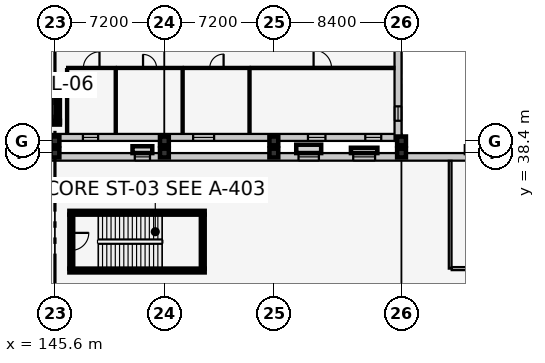
"""IFC4 building model, lengths in metres.
Left out: names, types, materials, properties, quantities, classifications, styles, units other than length and angle.
Written with IfcOpenShell. Run it as: python <this file> out.ifc"""

import sys

from ifc_helpers import new_model, si_unit, direction, frame, frame_2d, origin, origin_2d, place, context, subcontext, project, spatial, rectangle, extrude, element, fill, save


model = new_model("IFC4")
c1 = context("Model", 3, precision=1e-05, world=origin(), true_north=direction((0.0, 1.0)))
c2 = subcontext(c1, "Body", "Model", "MODEL_VIEW")
j1 = project(units=[si_unit("LENGTHUNIT", "METRE"), si_unit("PLANEANGLEUNIT", "RADIAN")], contexts=[c1])
p1 = place(None, origin())
s1 = spatial("IfcSite", under=j1, at=p1, CompositionType="ELEMENT")
p2 = place(p1, origin())
s2 = spatial("IfcBuilding", under=s1, at=p2, CompositionType="ELEMENT")
p3 = place(p2, origin())
s3 = spatial("IfcBuildingStorey", under=s2, at=p3, CompositionType="ELEMENT", Elevation=0.0)
for number, where, z_axis, x_axis in (
    (1, (145.6, 38.4, 0.0), (0.0, 0.0, 1.0), (1.0, 0.0, 0.0)),
    (2, (152.8, 38.4, 0.0), (0.0, 0.0, 1.0), (1.0, 0.0, 0.0)),
    (3, (160.0, 38.4, 0.0), (0.0, 0.0, 1.0), (1.0, 0.0, 0.0)),
    (4, (168.4, 38.4, 0.0), (0.0, 0.0, 1.0), (1.0, 0.0, 0.0)),
    (5, (145.6, 39.2, 0.0), (0.0, 0.0, 1.0), (1.0, 0.0, 0.0)),
    (6, (152.8, 39.2, 0.0), (0.0, 0.0, 1.0), (1.0, 0.0, 0.0)),
    (7, (160.0, 39.2, 0.0), (0.0, 0.0, 1.0), (1.0, 0.0, 0.0)),
    (8, (168.4, 39.2, 0.0), (0.0, 0.0, 1.0), (1.0, 0.0, 0.0)),
):
    element("IfcColumn", number, at=place(p3, frame(where, z_axis=z_axis, x_axis=x_axis)), inside=s3, PredefinedType="COLUMN", context=c2, shape_type="SweptSolid", body=[
        extrude(rectangle(XDim=0.58, YDim=0.58, at=origin_2d()), origin(), (0.0, 0.0, 1.0), 5.4),
    ])
p4 = place(p3, frame((124.0, 38.15, 0.0), z_axis=(0.0, 0.0, 1.0), x_axis=(1.0, 0.0, 0.0)))
e9 = element("IfcWall", 9, at=p4, inside=s3, PredefinedType="SOLIDWALL", context=c2, shape_type="SweptSolid", body=[
    extrude(rectangle(XDim=62.0, YDim=0.5, at=frame_2d((31.0, 0.0))), origin(), (0.0, 0.0, 1.0), 4.275),
])
p5 = place(p4, frame((17.1, 0.0, 0.0)))
e10 = element("IfcOpeningElement", 10, at=p5, cuts=e9, PredefinedType="OPENING", context=c2, shape_type="SweptSolid", body=[
    extrude(rectangle(XDim=1.8, YDim=2.3, at=frame_2d((0.9, 1.15))), frame((0.0, 0.262, 0.0), z_axis=(0.0, -1.0, 0.0), x_axis=(1.0, 0.0, 0.0)), (0.0, 0.0, 1.0), 0.524),
])
p6 = place(p4, frame((1.098, 0.0, 0.9)))
e11 = element("IfcOpeningElement", 11, at=p6, cuts=e9, PredefinedType="OPENING", context=c2, shape_type="SweptSolid", body=[
    extrude(rectangle(XDim=1.45, YDim=1.45, at=frame_2d((0.725, 0.725))), frame((0.0, 0.262, 0.0), z_axis=(0.0, -1.0, 0.0), x_axis=(1.0, 0.0, 0.0)), (0.0, 0.0, 1.0), 0.524),
])
p7 = place(p4, frame((26.853, 0.0, 0.9)))
e12 = element("IfcOpeningElement", 12, at=p7, cuts=e9, PredefinedType="OPENING", context=c2, shape_type="SweptSolid", body=[
    extrude(rectangle(XDim=1.0, YDim=1.75, at=frame_2d((0.5, 0.875))), frame((0.0, 0.262, 0.0), z_axis=(0.0, -1.0, 0.0), x_axis=(1.0, 0.0, 0.0)), (0.0, 0.0, 1.0), 0.524),
])
p8 = place(p4, frame((37.624, 0.0, 0.9)))
e13 = element("IfcOpeningElement", 13, at=p8, cuts=e9, PredefinedType="OPENING", context=c2, shape_type="SweptSolid", body=[
    extrude(rectangle(XDim=1.34, YDim=1.75, at=frame_2d((0.67, 0.875))), frame((0.0, 0.262, 0.0), z_axis=(0.0, -1.0, 0.0), x_axis=(1.0, 0.0, 0.0)), (0.0, 0.0, 1.0), 0.524),
])
p9 = place(p4, frame((41.221, 0.0, 0.9)))
e14 = element("IfcOpeningElement", 14, at=p9, cuts=e9, PredefinedType="OPENING", context=c2, shape_type="SweptSolid", body=[
    extrude(rectangle(XDim=1.44, YDim=1.75, at=frame_2d((0.72, 0.875))), frame((0.0, 0.262, 0.0), z_axis=(0.0, -1.0, 0.0), x_axis=(1.0, 0.0, 0.0)), (0.0, 0.0, 1.0), 0.524),
])
p10 = place(p4, frame((48.785, 0.0, 0.9)))
e15 = element("IfcOpeningElement", 15, at=p10, cuts=e9, PredefinedType="OPENING", context=c2, shape_type="SweptSolid", body=[
    extrude(rectangle(XDim=0.9, YDim=1.35, at=frame_2d((0.45, 0.675))), frame((0.0, 0.262, 0.0), z_axis=(0.0, -1.0, 0.0), x_axis=(1.0, 0.0, 0.0)), (0.0, 0.0, 1.0), 0.524),
])
p11 = place(p4, frame((55.979, 0.0, 0.9)))
e16 = element("IfcOpeningElement", 16, at=p11, cuts=e9, PredefinedType="OPENING", context=c2, shape_type="SweptSolid", body=[
    extrude(rectangle(XDim=1.1, YDim=1.35, at=frame_2d((0.55, 0.675))), frame((0.0, 0.262, 0.0), z_axis=(0.0, -1.0, 0.0), x_axis=(1.0, 0.0, 0.0)), (0.0, 0.0, 1.0), 0.524),
])
p12 = place(p4, frame((59.576, 0.0, 0.9)))
e17 = element("IfcOpeningElement", 17, at=p12, cuts=e9, PredefinedType="OPENING", context=c2, shape_type="SweptSolid", body=[
    extrude(rectangle(XDim=1.2, YDim=1.35, at=frame_2d((0.6, 0.675))), frame((0.0, 0.262, 0.0), z_axis=(0.0, -1.0, 0.0), x_axis=(1.0, 0.0, 0.0)), (0.0, 0.0, 1.0), 0.524),
])
p13 = place(p3, frame((168.4, 39.43, 0.0), z_axis=(0.0, 0.0, 1.0), x_axis=(-1.0, 0.0, 0.0)))
e18 = element("IfcWall", 18, at=p13, inside=s3, PredefinedType="SOLIDWALL", context=c2, shape_type="SweptSolid", body=[
    extrude(rectangle(XDim=37.2, YDim=0.46, at=frame_2d((18.6, 0.0))), origin(), (0.0, 0.0, 1.0), 4.315),
])
p14 = place(p13, frame((1.335, 0.0, 0.9)))
e19 = element("IfcOpeningElement", 19, at=p14, cuts=e18, PredefinedType="OPENING", context=c2, shape_type="SweptSolid", body=[
    extrude(rectangle(XDim=1.05, YDim=1.6, at=frame_2d((0.525, 0.8))), frame((0.0, 0.242, 0.0), z_axis=(0.0, -1.0, 0.0), x_axis=(1.0, 0.0, 0.0)), (0.0, 0.0, 1.0), 0.484),
])
p15 = place(p13, frame((5.005, 0.0, 0.9)))
e20 = element("IfcOpeningElement", 20, at=p15, cuts=e18, PredefinedType="OPENING", context=c2, shape_type="SweptSolid", body=[
    extrude(rectangle(XDim=1.15, YDim=1.6, at=frame_2d((0.575, 0.8))), frame((0.0, 0.242, 0.0), z_axis=(0.0, -1.0, 0.0), x_axis=(1.0, 0.0, 0.0)), (0.0, 0.0, 1.0), 0.484),
])
p16 = place(p13, frame((12.33, 0.0, 0.9)))
e21 = element("IfcOpeningElement", 21, at=p16, cuts=e18, PredefinedType="OPENING", context=c2, shape_type="SweptSolid", body=[
    extrude(rectangle(XDim=1.38, YDim=1.6, at=frame_2d((0.69, 0.8))), frame((0.0, 0.242, 0.0), z_axis=(0.0, -1.0, 0.0), x_axis=(1.0, 0.0, 0.0)), (0.0, 0.0, 1.0), 0.484),
])
p17 = place(p13, frame((19.96, 0.0, 0.9)))
e22 = element("IfcOpeningElement", 22, at=p17, cuts=e18, PredefinedType="OPENING", context=c2, shape_type="SweptSolid", body=[
    extrude(rectangle(XDim=1.0, YDim=1.75, at=frame_2d((0.5, 0.875))), frame((0.0, 0.242, 0.0), z_axis=(0.0, -1.0, 0.0), x_axis=(1.0, 0.0, 0.0)), (0.0, 0.0, 1.0), 0.484),
])
p18 = place(p13, frame((27.28, 0.0, 0.9)))
e23 = element("IfcOpeningElement", 23, at=p18, cuts=e18, PredefinedType="OPENING", context=c2, shape_type="SweptSolid", body=[
    extrude(rectangle(XDim=1.24, YDim=1.75, at=frame_2d((0.62, 0.875))), frame((0.0, 0.242, 0.0), z_axis=(0.0, -1.0, 0.0), x_axis=(1.0, 0.0, 0.0)), (0.0, 0.0, 1.0), 0.484),
])
p19 = place(p13, frame((30.95, 0.0, 0.9)))
e24 = element("IfcOpeningElement", 24, at=p19, cuts=e18, PredefinedType="OPENING", context=c2, shape_type="SweptSolid", body=[
    extrude(rectangle(XDim=1.34, YDim=1.75, at=frame_2d((0.67, 0.875))), frame((0.0, 0.242, 0.0), z_axis=(0.0, -1.0, 0.0), x_axis=(1.0, 0.0, 0.0)), (0.0, 0.0, 1.0), 0.484),
])
p20 = place(p13, frame((34.62, 0.0, 0.9)))
e25 = element("IfcOpeningElement", 25, at=p20, cuts=e18, PredefinedType="OPENING", context=c2, shape_type="SweptSolid", body=[
    extrude(rectangle(XDim=1.44, YDim=1.75, at=frame_2d((0.72, 0.875))), frame((0.0, 0.242, 0.0), z_axis=(0.0, -1.0, 0.0), x_axis=(1.0, 0.0, 0.0)), (0.0, 0.0, 1.0), 0.484),
])
p21 = place(p3, frame((168.17, 68.0, 0.0), z_axis=(0.0, 0.0, 1.0), x_axis=(0.0, -1.0, 0.0)))
e26 = element("IfcWall", 26, at=p21, inside=s3, PredefinedType="SOLIDWALL", context=c2, shape_type="SweptSolid", body=[
    extrude(rectangle(XDim=28.8, YDim=0.46, at=frame_2d((14.4, 0.0))), origin(), (0.0, 0.0, 1.0), 4.555),
])
p22 = place(p21, frame((1.05, 0.0, 0.9)))
e27 = element("IfcOpeningElement", 27, at=p22, cuts=e26, PredefinedType="OPENING", context=c2, shape_type="SweptSolid", body=[
    extrude(rectangle(XDim=1.5, YDim=1.75, at=frame_2d((0.75, 0.875))), frame((0.0, 0.242, 0.0), z_axis=(0.0, -1.0, 0.0), x_axis=(1.0, 0.0, 0.0)), (0.0, 0.0, 1.0), 0.484),
])
p23 = place(p21, frame((4.95, 0.0, 0.9)))
e28 = element("IfcOpeningElement", 28, at=p23, cuts=e26, PredefinedType="OPENING", context=c2, shape_type="SweptSolid", body=[
    extrude(rectangle(XDim=0.9, YDim=1.35, at=frame_2d((0.45, 0.675))), frame((0.0, 0.242, 0.0), z_axis=(0.0, -1.0, 0.0), x_axis=(1.0, 0.0, 0.0)), (0.0, 0.0, 1.0), 0.484),
])
p24 = place(p21, frame((8.5, 0.0, 0.9)))
e29 = element("IfcOpeningElement", 29, at=p24, cuts=e26, PredefinedType="OPENING", context=c2, shape_type="SweptSolid", body=[
    extrude(rectangle(XDim=1.0, YDim=1.35, at=frame_2d((0.5, 0.675))), frame((0.0, 0.242, 0.0), z_axis=(0.0, -1.0, 0.0), x_axis=(1.0, 0.0, 0.0)), (0.0, 0.0, 1.0), 0.484),
])
p25 = place(p21, frame((12.05, 0.0, 0.9)))
e30 = element("IfcOpeningElement", 30, at=p25, cuts=e26, PredefinedType="OPENING", context=c2, shape_type="SweptSolid", body=[
    extrude(rectangle(XDim=1.1, YDim=1.35, at=frame_2d((0.55, 0.675))), frame((0.0, 0.242, 0.0), z_axis=(0.0, -1.0, 0.0), x_axis=(1.0, 0.0, 0.0)), (0.0, 0.0, 1.0), 0.484),
])
p26 = place(p21, frame((15.6, 0.0, 0.9)))
e31 = element("IfcOpeningElement", 31, at=p26, cuts=e26, PredefinedType="OPENING", context=c2, shape_type="SweptSolid", body=[
    extrude(rectangle(XDim=1.2, YDim=1.35, at=frame_2d((0.6, 0.675))), frame((0.0, 0.242, 0.0), z_axis=(0.0, -1.0, 0.0), x_axis=(1.0, 0.0, 0.0)), (0.0, 0.0, 1.0), 0.484),
])
p27 = place(p21, frame((19.15, 0.0, 0.9)))
e32 = element("IfcOpeningElement", 32, at=p27, cuts=e26, PredefinedType="OPENING", context=c2, shape_type="SweptSolid", body=[
    extrude(rectangle(XDim=1.3, YDim=1.35, at=frame_2d((0.65, 0.675))), frame((0.0, 0.242, 0.0), z_axis=(0.0, -1.0, 0.0), x_axis=(1.0, 0.0, 0.0)), (0.0, 0.0, 1.0), 0.484),
])
p28 = place(p21, frame((26.525, 0.0, 0.9)))
e33 = element("IfcOpeningElement", 33, at=p28, cuts=e26, PredefinedType="OPENING", context=c2, shape_type="SweptSolid", body=[
    extrude(rectangle(XDim=0.95, YDim=1.45, at=frame_2d((0.475, 0.725))), frame((0.0, 0.242, 0.0), z_axis=(0.0, -1.0, 0.0), x_axis=(1.0, 0.0, 0.0)), (0.0, 0.0, 1.0), 0.484),
])
for number, where, z_axis, x_axis in (
    (34, (146.55, 30.675, 0.0), (0.0, 0.0, 1.0), (1.0, 0.0, 0.0)),
    (35, (155.45, 34.475, 0.0), (0.0, 0.0, 1.0), (-1.0, 0.0, 0.0)),
):
    element("IfcWall", number, at=place(p3, frame(where, z_axis=z_axis, x_axis=x_axis)), inside=s3, PredefinedType="SHEAR", context=c2, shape_type="SweptSolid", body=[
        extrude(rectangle(XDim=8.9, YDim=0.25, at=frame_2d((4.45, 0.0))), origin(), (0.0, 0.0, 1.0), 5.12),
    ])
p29 = place(p3, frame((146.675, 34.35, 0.0), z_axis=(0.0, 0.0, 1.0), x_axis=(0.0, -1.0, 0.0)))
e36 = element("IfcWall", 36, at=p29, inside=s3, PredefinedType="SHEAR", context=c2, shape_type="SweptSolid", body=[
    extrude(rectangle(XDim=3.55, YDim=0.25, at=frame_2d((1.775, 0.0))), origin(), (0.0, 0.0, 1.0), 5.12),
])
p30 = place(p29, frame((1.2, 0.0, 0.0)))
e37 = element("IfcOpeningElement", 37, at=p30, cuts=e36, PredefinedType="OPENING", context=c2, shape_type="SweptSolid", body=[
    extrude(rectangle(XDim=1.15, YDim=2.15, at=frame_2d((0.575, 1.075))), frame((0.0, 0.137, 0.0), z_axis=(0.0, -1.0, 0.0), x_axis=(1.0, 0.0, 0.0)), (0.0, 0.0, 1.0), 0.274),
])
p31 = place(p3, frame((155.325, 30.8, 0.0), z_axis=(0.0, 0.0, 1.0), x_axis=(0.0, 1.0, 0.0)))
e38 = element("IfcWall", 38, at=p31, inside=s3, PredefinedType="SHEAR", context=c2, shape_type="SweptSolid", body=[
    extrude(rectangle(XDim=3.55, YDim=0.25, at=frame_2d((1.775, 0.0))), origin(), (0.0, 0.0, 1.0), 5.12),
])
p32 = place(p3, frame((143.875, 40.4, 0.0), z_axis=(0.0, 0.0, 1.0), x_axis=(1.0, 0.0, 0.0)))
e39 = element("IfcWall", 39, at=p32, inside=s3, PredefinedType="SHEAR", context=c2, shape_type="SweptSolid", body=[
    extrude(rectangle(XDim=2.05, YDim=0.25, at=frame_2d((1.025, 0.0))), origin(), (0.0, 0.0, 1.0), 5.16),
])
p33 = place(p3, frame((145.925, 42.4, 0.0), z_axis=(0.0, 0.0, 1.0), x_axis=(-1.0, 0.0, 0.0)))
e40 = element("IfcWall", 40, at=p33, inside=s3, PredefinedType="SHEAR", context=c2, shape_type="SweptSolid", body=[
    extrude(rectangle(XDim=2.05, YDim=0.25, at=frame_2d((1.025, 0.0))), origin(), (0.0, 0.0, 1.0), 5.16),
])
p34 = place(p33, frame((0.55, 0.0, 0.0)))
e41 = element("IfcOpeningElement", 41, at=p34, cuts=e40, PredefinedType="OPENING", context=c2, shape_type="SweptSolid", body=[
    extrude(rectangle(XDim=0.95, YDim=2.1, at=frame_2d((0.475, 1.05))), frame((0.0, 0.137, 0.0), z_axis=(0.0, -1.0, 0.0), x_axis=(1.0, 0.0, 0.0)), (0.0, 0.0, 1.0), 0.274),
])
p35 = place(p3, frame((145.8, 40.4, 0.0), z_axis=(0.0, 0.0, 1.0), x_axis=(0.0, 1.0, 0.0)))
e42 = element("IfcWall", 42, at=p35, inside=s3, PredefinedType="SHEAR", context=c2, shape_type="SweptSolid", body=[
    extrude(rectangle(XDim=2.0, YDim=0.25, at=frame_2d((1.0, 0.0))), origin(), (0.0, 0.0, 1.0), 5.16),
])
p36 = place(p3, frame((171.6, 30.8, 0.0), z_axis=(0.0, 0.0, 1.0), x_axis=(0.0, 1.0, 0.0)))
e43 = element("IfcWall", 43, at=p36, inside=s3, PredefinedType="PARTITIONING", context=c2, shape_type="SweptSolid", body=[
    extrude(rectangle(XDim=7.09, YDim=0.18, at=frame_2d((3.545, 0.0))), origin(), (0.0, 0.0, 1.0), 5.12),
])
p37 = place(p3, frame((171.7, 30.8, 0.0), z_axis=(0.0, 0.0, 1.0), x_axis=(1.0, 0.0, 0.0)))
e44 = element("IfcWall", 44, at=p37, inside=s3, PredefinedType="PARTITIONING", context=c2, shape_type="SweptSolid", body=[
    extrude(rectangle(XDim=13.79, YDim=0.2, at=frame_2d((6.895, 0.0))), origin(), (0.0, 0.0, 1.0), 5.12),
])
p38 = place(p37, frame((6.235, 0.0, 0.0)))
e45 = element("IfcOpeningElement", 45, at=p38, cuts=e44, PredefinedType="OPENING", context=c2, shape_type="SweptSolid", body=[
    extrude(rectangle(XDim=1.32, YDim=2.15, at=frame_2d((0.66, 1.075))), frame((0.0, 0.112, 0.0), z_axis=(0.0, -1.0, 0.0), x_axis=(1.0, 0.0, 0.0)), (0.0, 0.0, 1.0), 0.224),
])
p39 = place(p3, frame((146.4, 44.0, 0.0), z_axis=(0.0, 0.0, 1.0), x_axis=(1.0, 0.0, 0.0)))
e46 = element("IfcWall", 46, at=p39, inside=s3, PredefinedType="PARTITIONING", context=c2, shape_type="SweptSolid", body=[
    extrude(rectangle(XDim=3.2, YDim=0.14, at=frame_2d((1.6, 0.0))), origin(), (0.0, 0.0, 1.0), 5.16),
])
p40 = place(p39, frame((1.07, 0.0, 0.0)))
e47 = element("IfcOpeningElement", 47, at=p40, cuts=e46, PredefinedType="OPENING", context=c2, shape_type="SweptSolid", body=[
    extrude(rectangle(XDim=1.06, YDim=2.1, at=frame_2d((0.53, 1.05))), frame((0.0, 0.082, 0.0), z_axis=(0.0, -1.0, 0.0), x_axis=(1.0, 0.0, 0.0)), (0.0, 0.0, 1.0), 0.164),
])
for number, where, z_axis, x_axis in (
    (48, (146.4, 39.67, 0.0), (0.0, 0.0, 1.0), (0.0, 1.0, 0.0)),
    (49, (149.6, 39.67, 0.0), (0.0, 0.0, 1.0), (0.0, 1.0, 0.0)),
):
    element("IfcWall", number, at=place(p3, frame(where, z_axis=z_axis, x_axis=x_axis)), inside=s3, PredefinedType="PARTITIONING", context=c2, shape_type="SweptSolid", body=[
        extrude(rectangle(XDim=4.25, YDim=0.14, at=frame_2d((2.125, 0.0))), origin(), (0.0, 0.0, 1.0), 5.16),
    ])
p41 = place(p3, frame((149.68, 44.0, 0.0), z_axis=(0.0, 0.0, 1.0), x_axis=(1.0, 0.0, 0.0)))
e50 = element("IfcWall", 50, at=p41, inside=s3, PredefinedType="PARTITIONING", context=c2, shape_type="SweptSolid", body=[
    extrude(rectangle(XDim=4.32, YDim=0.14, at=frame_2d((2.16, 0.0))), origin(), (0.0, 0.0, 1.0), 5.16),
])
p42 = place(p41, frame((1.715, 0.0, 0.0)))
e51 = element("IfcOpeningElement", 51, at=p42, cuts=e50, PredefinedType="OPENING", context=c2, shape_type="SweptSolid", body=[
    extrude(rectangle(XDim=0.89, YDim=2.05, at=frame_2d((0.445, 1.025))), frame((0.0, 0.082, 0.0), z_axis=(0.0, -1.0, 0.0), x_axis=(1.0, 0.0, 0.0)), (0.0, 0.0, 1.0), 0.164),
])
p43 = place(p3, frame((154.0, 39.67, 0.0), z_axis=(0.0, 0.0, 1.0), x_axis=(0.0, 1.0, 0.0)))
e52 = element("IfcWall", 52, at=p43, inside=s3, PredefinedType="PARTITIONING", context=c2, shape_type="SweptSolid", body=[
    extrude(rectangle(XDim=4.25, YDim=0.14, at=frame_2d((2.125, 0.0))), origin(), (0.0, 0.0, 1.0), 5.16),
])
p44 = place(p3, frame((154.08, 44.0, 0.0), z_axis=(0.0, 0.0, 1.0), x_axis=(1.0, 0.0, 0.0)))
e53 = element("IfcWall", 53, at=p44, inside=s3, PredefinedType="PARTITIONING", context=c2, shape_type="SweptSolid", body=[
    extrude(rectangle(XDim=4.32, YDim=0.14, at=frame_2d((2.16, 0.0))), origin(), (0.0, 0.0, 1.0), 5.16),
])
p45 = place(p44, frame((1.705, 0.0, 0.0)))
e54 = element("IfcOpeningElement", 54, at=p45, cuts=e53, PredefinedType="OPENING", context=c2, shape_type="SweptSolid", body=[
    extrude(rectangle(XDim=0.91, YDim=2.06, at=frame_2d((0.455, 1.03))), frame((0.0, 0.082, 0.0), z_axis=(0.0, -1.0, 0.0), x_axis=(1.0, 0.0, 0.0)), (0.0, 0.0, 1.0), 0.164),
])
p46 = place(p3, frame((158.4, 39.67, 0.0), z_axis=(0.0, 0.0, 1.0), x_axis=(0.0, 1.0, 0.0)))
e55 = element("IfcWall", 55, at=p46, inside=s3, PredefinedType="PARTITIONING", context=c2, shape_type="SweptSolid", body=[
    extrude(rectangle(XDim=4.25, YDim=0.14, at=frame_2d((2.125, 0.0))), origin(), (0.0, 0.0, 1.0), 5.16),
])
p47 = place(p3, frame((158.48, 44.0, 0.0), z_axis=(0.0, 0.0, 1.0), x_axis=(1.0, 0.0, 0.0)))
e56 = element("IfcWall", 56, at=p47, inside=s3, PredefinedType="PARTITIONING", context=c2, shape_type="SweptSolid", body=[
    extrude(rectangle(XDim=9.45, YDim=0.15, at=frame_2d((4.725, 0.0))), origin(), (0.0, 0.0, 1.0), 5.16),
])
p48 = place(p47, frame((4.135, 0.0, 0.0)))
e57 = element("IfcOpeningElement", 57, at=p48, cuts=e56, PredefinedType="OPENING", context=c2, shape_type="SweptSolid", body=[
    extrude(rectangle(XDim=1.18, YDim=2.2, at=frame_2d((0.59, 1.1))), frame((0.0, 0.087, 0.0), z_axis=(0.0, -1.0, 0.0), x_axis=(1.0, 0.0, 0.0)), (0.0, 0.0, 1.0), 0.174),
])
p49 = place(p7, origin())
e58 = element("IfcWindow", 58, at=p49, inside=s3, PartitioningType="SINGLE_PANEL", PredefinedType="WINDOW", context=c2, shape_type="SweptSolid", body=[
    extrude(rectangle(XDim=1.0, YDim=1.75, at=frame_2d((0.5, 0.875))), frame((0.0, 0.03, 0.0), z_axis=(0.0, -1.0, 0.0), x_axis=(1.0, 0.0, 0.0)), (0.0, 0.0, 1.0), 0.06),
])
fill(e12, e58)
p50 = place(p8, origin())
e59 = element("IfcWindow", 59, at=p50, inside=s3, PartitioningType="SINGLE_PANEL", PredefinedType="WINDOW", context=c2, shape_type="SweptSolid", body=[
    extrude(rectangle(XDim=1.34, YDim=1.75, at=frame_2d((0.67, 0.875))), frame((0.0, 0.03, 0.0), z_axis=(0.0, -1.0, 0.0), x_axis=(1.0, 0.0, 0.0)), (0.0, 0.0, 1.0), 0.06),
])
fill(e13, e59)
p51 = place(p9, origin())
e60 = element("IfcWindow", 60, at=p51, inside=s3, PartitioningType="SINGLE_PANEL", PredefinedType="WINDOW", context=c2, shape_type="SweptSolid", body=[
    extrude(rectangle(XDim=1.44, YDim=1.75, at=frame_2d((0.72, 0.875))), frame((0.0, 0.03, 0.0), z_axis=(0.0, -1.0, 0.0), x_axis=(1.0, 0.0, 0.0)), (0.0, 0.0, 1.0), 0.06),
])
fill(e14, e60)
p52 = place(p14, origin())
e61 = element("IfcWindow", 61, at=p52, inside=s3, PartitioningType="SINGLE_PANEL", PredefinedType="WINDOW", context=c2, shape_type="SweptSolid", body=[
    extrude(rectangle(XDim=1.05, YDim=1.6, at=frame_2d((0.525, 0.8))), frame((0.0, 0.03, 0.0), z_axis=(0.0, -1.0, 0.0), x_axis=(1.0, 0.0, 0.0)), (0.0, 0.0, 1.0), 0.06),
])
fill(e19, e61)
p53 = place(p15, origin())
e62 = element("IfcWindow", 62, at=p53, inside=s3, PartitioningType="SINGLE_PANEL", PredefinedType="WINDOW", context=c2, shape_type="SweptSolid", body=[
    extrude(rectangle(XDim=1.15, YDim=1.6, at=frame_2d((0.575, 0.8))), frame((0.0, 0.03, 0.0), z_axis=(0.0, -1.0, 0.0), x_axis=(1.0, 0.0, 0.0)), (0.0, 0.0, 1.0), 0.06),
])
fill(e20, e62)
p54 = place(p16, origin())
e63 = element("IfcWindow", 63, at=p54, inside=s3, PartitioningType="SINGLE_PANEL", PredefinedType="WINDOW", context=c2, shape_type="SweptSolid", body=[
    extrude(rectangle(XDim=1.38, YDim=1.6, at=frame_2d((0.69, 0.8))), frame((0.0, 0.03, 0.0), z_axis=(0.0, -1.0, 0.0), x_axis=(1.0, 0.0, 0.0)), (0.0, 0.0, 1.0), 0.06),
])
fill(e21, e63)
p55 = place(p17, origin())
e64 = element("IfcWindow", 64, at=p55, inside=s3, PartitioningType="SINGLE_PANEL", PredefinedType="WINDOW", context=c2, shape_type="SweptSolid", body=[
    extrude(rectangle(XDim=1.0, YDim=1.75, at=frame_2d((0.5, 0.875))), frame((0.0, 0.03, 0.0), z_axis=(0.0, -1.0, 0.0), x_axis=(1.0, 0.0, 0.0)), (0.0, 0.0, 1.0), 0.06),
])
fill(e22, e64)
p56 = place(p28, origin())
e65 = element("IfcWindow", 65, at=p56, inside=s3, PartitioningType="SINGLE_PANEL", PredefinedType="WINDOW", context=c2, shape_type="SweptSolid", body=[
    extrude(rectangle(XDim=0.95, YDim=1.45, at=frame_2d((0.475, 0.725))), frame((0.0, 0.03, 0.0), z_axis=(0.0, -1.0, 0.0), x_axis=(1.0, 0.0, 0.0)), (0.0, 0.0, 1.0), 0.06),
])
fill(e33, e65)
p57 = place(p30, origin())
e66 = element("IfcDoor", 66, at=p57, inside=s3, OperationType="SINGLE_SWING_LEFT", PredefinedType="DOOR", context=c2, shape_type="SweptSolid", body=[
    extrude(rectangle(XDim=1.15, YDim=2.15, at=frame_2d((0.575, 1.075))), frame((0.0, 0.025, 0.0), z_axis=(0.0, -1.0, 0.0), x_axis=(1.0, 0.0, 0.0)), (0.0, 0.0, 1.0), 0.05),
])
fill(e37, e66)
p58 = place(p40, origin())
e67 = element("IfcDoor", 67, at=p58, inside=s3, OperationType="SINGLE_SWING_RIGHT", PredefinedType="DOOR", context=c2, shape_type="SweptSolid", body=[
    extrude(rectangle(XDim=1.06, YDim=2.1, at=frame_2d((0.53, 1.05))), frame((0.0, 0.025, 0.0), z_axis=(0.0, -1.0, 0.0), x_axis=(1.0, 0.0, 0.0)), (0.0, 0.0, 1.0), 0.05),
])
fill(e47, e67)
p59 = place(p42, origin())
e68 = element("IfcDoor", 68, at=p59, inside=s3, OperationType="SINGLE_SWING_LEFT", PredefinedType="DOOR", context=c2, shape_type="SweptSolid", body=[
    extrude(rectangle(XDim=0.89, YDim=2.05, at=frame_2d((0.445, 1.025))), frame((0.0, 0.025, 0.0), z_axis=(0.0, -1.0, 0.0), x_axis=(1.0, 0.0, 0.0)), (0.0, 0.0, 1.0), 0.05),
])
fill(e51, e68)
p60 = place(p45, origin())
e69 = element("IfcDoor", 69, at=p60, inside=s3, OperationType="SINGLE_SWING_RIGHT", PredefinedType="DOOR", context=c2, shape_type="SweptSolid", body=[
    extrude(rectangle(XDim=0.91, YDim=2.06, at=frame_2d((0.455, 1.03))), frame((0.0, 0.025, 0.0), z_axis=(0.0, -1.0, 0.0), x_axis=(1.0, 0.0, 0.0)), (0.0, 0.0, 1.0), 0.05),
])
fill(e54, e69)
p61 = place(p48, origin())
e70 = element("IfcDoor", 70, at=p61, inside=s3, OperationType="SINGLE_SWING_LEFT", PredefinedType="DOOR", context=c2, shape_type="SweptSolid", body=[
    extrude(rectangle(XDim=1.18, YDim=2.2, at=frame_2d((0.59, 1.1))), frame((0.0, 0.025, 0.0), z_axis=(0.0, -1.0, 0.0), x_axis=(1.0, 0.0, 0.0)), (0.0, 0.0, 1.0), 0.05),
])
fill(e57, e70)
save(model, sys.argv[1])
